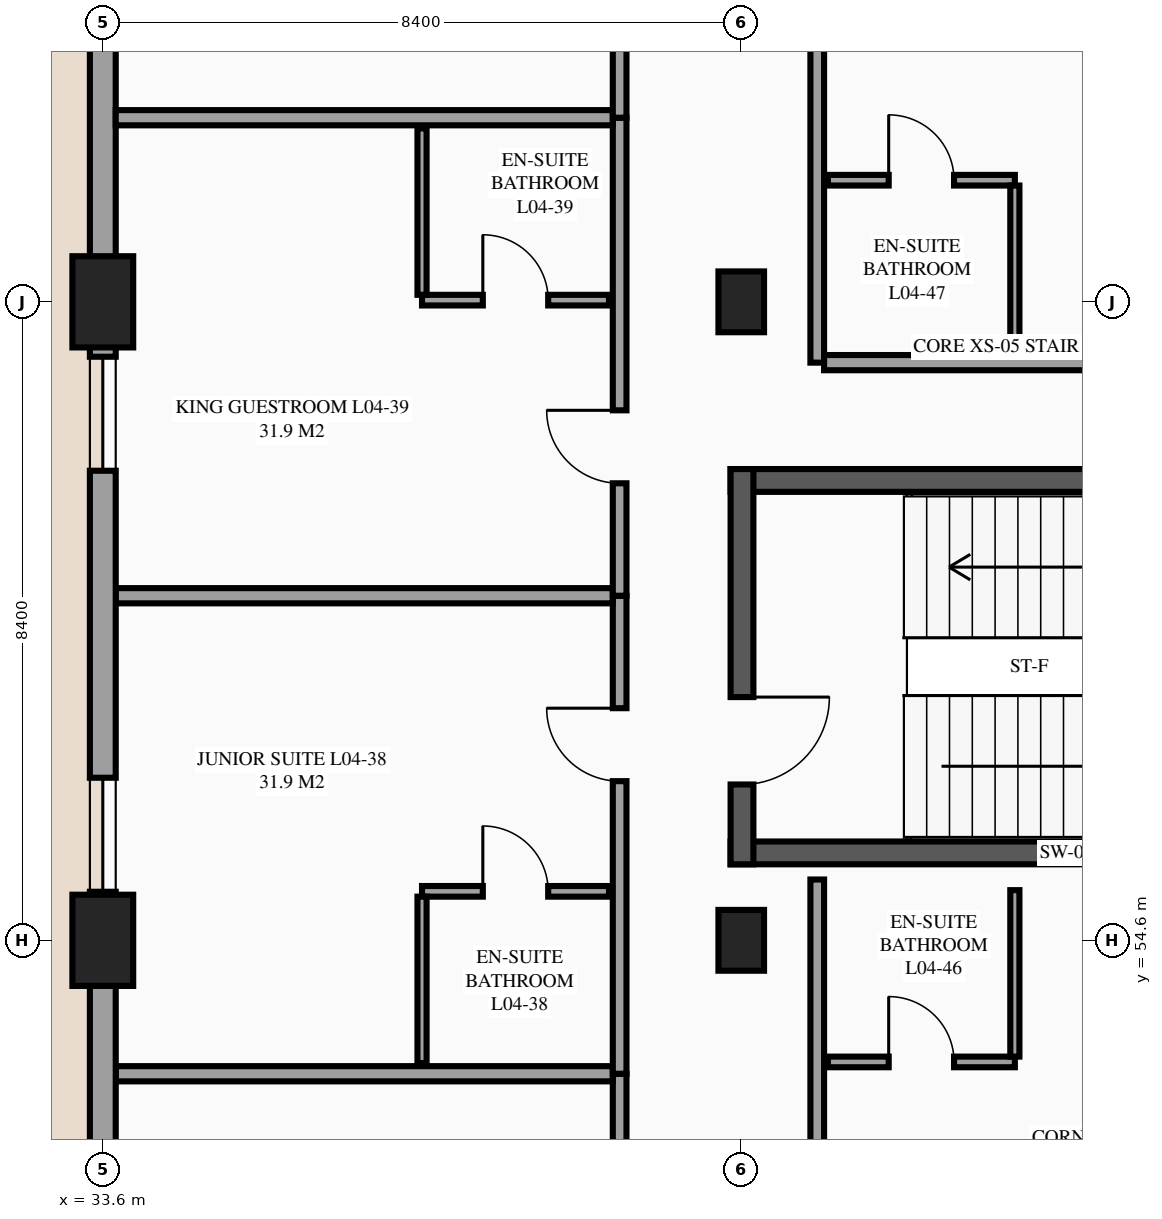
"""IFC4 building model, lengths in metres.
Left out: names, types, materials, properties, quantities, classifications, styles, units other than length and angle.
Written with IfcOpenShell. Run it as: python <this file> out.ifc"""

import sys

from ifc_helpers import new_model, si_unit, direction, frame, frame_2d, origin, origin_2d, place, context, subcontext, project, spatial, rectangle, extrude, element, fill, save


model = new_model("IFC4")
c1 = context("Model", 3, precision=1e-05, world=origin(), true_north=direction((0.0, 1.0)))
c2 = subcontext(c1, "Body", "Model", "MODEL_VIEW")
j1 = project(units=[si_unit("LENGTHUNIT", "METRE"), si_unit("PLANEANGLEUNIT", "RADIAN")], contexts=[c1])
p1 = place(None, origin())
s1 = spatial("IfcSite", under=j1, at=p1, CompositionType="ELEMENT")
p2 = place(p1, origin())
s2 = spatial("IfcBuilding", under=s1, at=p2, CompositionType="ELEMENT")
p3 = place(p2, frame((0.0, 0.0, 18.3)))
s3 = spatial("IfcBuildingStorey", under=s2, at=p3, CompositionType="ELEMENT", Elevation=18.3)
for number, where, z_axis, x_axis in (
    (1, (33.6, 54.6, 0.0), (0.0, 0.0, 1.0), (1.0, 0.0, 0.0)),
    (2, (33.6, 63.0, 0.0), (0.0, 0.0, 1.0), (1.0, 0.0, 0.0)),
):
    element("IfcColumn", number, at=place(p3, frame(where, z_axis=z_axis, x_axis=x_axis)), inside=s3, PredefinedType="COLUMN", context=c2, shape_type="SweptSolid", body=[
        extrude(rectangle(XDim=0.8, YDim=1.2, at=origin_2d()), origin(), (0.0, 0.0, 1.0), 3.6),
    ])
for number, where, z_axis, x_axis in (
    (3, (42.0, 54.6, 0.0), (0.0, 0.0, 1.0), (1.0, 0.0, 0.0)),
    (4, (42.0, 63.0, 0.0), (0.0, 0.0, 1.0), (1.0, 0.0, 0.0)),
):
    element("IfcColumn", number, at=place(p3, frame(where, z_axis=z_axis, x_axis=x_axis)), inside=s3, PredefinedType="COLUMN", context=c2, shape_type="SweptSolid", body=[
        extrude(rectangle(XDim=0.6, YDim=0.8, at=origin_2d()), origin(), (0.0, 0.0, 1.0), 3.6),
    ])
p4 = place(p3, frame((33.6, 79.8, 0.0), z_axis=(0.0, 0.0, 1.0), x_axis=(0.0, -1.0, 0.0)))
e5 = element("IfcWall", 5, at=p4, inside=s3, PredefinedType="STANDARD", context=c2, shape_type="SweptSolid", body=[
    extrude(rectangle(XDim=16.8, YDim=0.34, at=frame_2d((8.4, 0.0))), origin(), (0.0, 0.0, 1.0), 2.53),
])
p5 = place(p4, frame((10.483, 0.0, 0.85)))
e6 = element("IfcOpeningElement", 6, at=p5, cuts=e5, PredefinedType="OPENING", context=c2, shape_type="SweptSolid", body=[
    extrude(rectangle(XDim=1.5, YDim=1.5, at=frame_2d((0.75, 0.75))), frame((0.0, 0.18, 0.0), z_axis=(0.0, -1.0, 0.0), x_axis=(1.0, 0.0, 0.0)), (0.0, 0.0, 1.0), 0.36),
])
p6 = place(p4, frame((4.344, 0.0, 0.85)))
e7 = element("IfcOpeningElement", 7, at=p6, cuts=e5, PredefinedType="OPENING", context=c2, shape_type="SweptSolid", body=[
    extrude(rectangle(XDim=1.2, YDim=1.5, at=frame_2d((0.6, 0.75))), frame((0.0, 0.18, 0.0), z_axis=(0.0, -1.0, 0.0), x_axis=(1.0, 0.0, 0.0)), (0.0, 0.0, 1.0), 0.36),
])
for number, where, z_axis, x_axis in (
    (8, (41.86, 55.75, 0.0), (0.0, 0.0, 1.0), (1.0, 0.0, 0.0)),
    (9, (50.7, 60.65, 0.0), (0.0, 0.0, 1.0), (-1.0, 0.0, 0.0)),
):
    element("IfcWall", number, at=place(p3, frame(where, z_axis=z_axis, x_axis=x_axis)), inside=s3, PredefinedType="SHEAR", context=c2, shape_type="SweptSolid", body=[
        extrude(rectangle(XDim=8.84, YDim=0.3, at=frame_2d((4.42, 0.0))), origin(), (0.0, 0.0, 1.0), 3.6),
    ])
p7 = place(p3, frame((42.01, 60.8, 0.0), z_axis=(0.0, 0.0, 1.0), x_axis=(0.0, -1.0, 0.0)))
e10 = element("IfcWall", 10, at=p7, inside=s3, PredefinedType="SHEAR", context=c2, shape_type="SweptSolid", body=[
    extrude(rectangle(XDim=5.2, YDim=0.3, at=frame_2d((2.6, 0.0))), origin(), (0.0, 0.0, 1.0), 3.6),
])
p8 = place(p7, frame((3.0, 0.0, 0.0)))
e11 = element("IfcOpeningElement", 11, at=p8, cuts=e10, PredefinedType="OPENING", context=c2, shape_type="SweptSolid", body=[
    extrude(rectangle(XDim=1.15, YDim=2.15, at=frame_2d((0.575, 1.075))), frame((0.0, 0.16, 0.0), z_axis=(0.0, -1.0, 0.0), x_axis=(1.0, 0.0, 0.0)), (0.0, 0.0, 1.0), 0.32),
])
p9 = place(p3, frame((40.4, 46.556, 0.0), z_axis=(0.0, 0.0, 1.0), x_axis=(0.0, 1.0, 0.0)))
e12 = element("IfcWall", 12, at=p9, inside=s3, PredefinedType="PARTITIONING", context=c2, shape_type="SweptSolid", body=[
    extrude(rectangle(XDim=6.289, YDim=0.18, at=frame_2d((3.145, 0.0))), origin(), (0.0, 0.0, 1.0), 3.375),
])
p10 = place(p9, frame((3.849, 0.0, 0.0)))
e13 = element("IfcOpeningElement", 13, at=p10, cuts=e12, PredefinedType="OPENING", context=c2, shape_type="SweptSolid", body=[
    extrude(rectangle(XDim=0.96, YDim=2.15, at=frame_2d((0.48, 1.075))), frame((0.0, 0.1, 0.0), z_axis=(0.0, -1.0, 0.0), x_axis=(1.0, 0.0, 0.0)), (0.0, 0.0, 1.0), 0.2),
])
p11 = place(p3, frame((33.77, 52.844, 0.0), z_axis=(0.0, 0.0, 1.0), x_axis=(1.0, 0.0, 0.0)))
e14 = element("IfcWall", 14, at=p11, inside=s3, PredefinedType="PARTITIONING", context=c2, shape_type="SweptSolid", body=[
    extrude(rectangle(XDim=6.54, YDim=0.2, at=frame_2d((3.27, 0.0))), origin(), (0.0, 0.0, 1.0), 3.375),
])
p12 = place(p3, frame((40.4, 52.844, 0.0), z_axis=(0.0, 0.0, 1.0), x_axis=(0.0, 1.0, 0.0)))
e15 = element("IfcWall", 15, at=p12, inside=s3, PredefinedType="PARTITIONING", context=c2, shape_type="SweptSolid", body=[
    extrude(rectangle(XDim=6.289, YDim=0.18, at=frame_2d((3.145, 0.0))), origin(), (0.0, 0.0, 1.0), 3.375),
])
p13 = place(p12, frame((3.85, 0.0, 0.0)))
e16 = element("IfcOpeningElement", 16, at=p13, cuts=e15, PredefinedType="OPENING", context=c2, shape_type="SweptSolid", body=[
    extrude(rectangle(XDim=0.96, YDim=2.15, at=frame_2d((0.48, 1.075))), frame((0.0, 0.1, 0.0), z_axis=(0.0, -1.0, 0.0), x_axis=(1.0, 0.0, 0.0)), (0.0, 0.0, 1.0), 0.2),
])
p14 = place(p3, frame((33.77, 59.133, 0.0), z_axis=(0.0, 0.0, 1.0), x_axis=(1.0, 0.0, 0.0)))
e17 = element("IfcWall", 17, at=p14, inside=s3, PredefinedType="PARTITIONING", context=c2, shape_type="SweptSolid", body=[
    extrude(rectangle(XDim=6.54, YDim=0.2, at=frame_2d((3.27, 0.0))), origin(), (0.0, 0.0, 1.0), 3.375),
])
p15 = place(p3, frame((37.8, 55.244, 0.0), z_axis=(0.0, 0.0, 1.0), x_axis=(1.0, 0.0, 0.0)))
e18 = element("IfcWall", 18, at=p15, inside=s3, PredefinedType="PARTITIONING", context=c2, shape_type="SweptSolid", body=[
    extrude(rectangle(XDim=2.46, YDim=0.14, at=frame_2d((1.23, 0.0))), origin(), (0.0, 0.0, 1.0), 3.375),
])
p16 = place(p15, frame((0.8, 0.0, 0.0)))
e19 = element("IfcOpeningElement", 19, at=p16, cuts=e18, PredefinedType="OPENING", context=c2, shape_type="SweptSolid", body=[
    extrude(rectangle(XDim=0.86, YDim=2.1, at=frame_2d((0.43, 1.05))), frame((0.0, 0.08, 0.0), z_axis=(0.0, -1.0, 0.0), x_axis=(1.0, 0.0, 0.0)), (0.0, 0.0, 1.0), 0.16),
])
p17 = place(p3, frame((37.8, 52.984, 0.0), z_axis=(0.0, 0.0, 1.0), x_axis=(0.0, 1.0, 0.0)))
e20 = element("IfcWall", 20, at=p17, inside=s3, PredefinedType="PARTITIONING", context=c2, shape_type="SweptSolid", body=[
    extrude(rectangle(XDim=2.19, YDim=0.12, at=frame_2d((1.095, 0.0))), origin(), (0.0, 0.0, 1.0), 3.375),
])
p18 = place(p3, frame((40.4, 59.133, 0.0), z_axis=(0.0, 0.0, 1.0), x_axis=(0.0, 1.0, 0.0)))
e21 = element("IfcWall", 21, at=p18, inside=s3, PredefinedType="PARTITIONING", context=c2, shape_type="SweptSolid", body=[
    extrude(rectangle(XDim=6.289, YDim=0.18, at=frame_2d((3.145, 0.0))), origin(), (0.0, 0.0, 1.0), 3.375),
])
p19 = place(p18, frame((1.479, 0.0, 0.0)))
e22 = element("IfcOpeningElement", 22, at=p19, cuts=e21, PredefinedType="OPENING", context=c2, shape_type="SweptSolid", body=[
    extrude(rectangle(XDim=0.96, YDim=2.15, at=frame_2d((0.48, 1.075))), frame((0.0, 0.1, 0.0), z_axis=(0.0, -1.0, 0.0), x_axis=(1.0, 0.0, 0.0)), (0.0, 0.0, 1.0), 0.2),
])
p20 = place(p3, frame((33.77, 65.422, 0.0), z_axis=(0.0, 0.0, 1.0), x_axis=(1.0, 0.0, 0.0)))
e23 = element("IfcWall", 23, at=p20, inside=s3, PredefinedType="PARTITIONING", context=c2, shape_type="SweptSolid", body=[
    extrude(rectangle(XDim=6.54, YDim=0.2, at=frame_2d((3.27, 0.0))), origin(), (0.0, 0.0, 1.0), 3.375),
])
p21 = place(p3, frame((37.8, 63.022, 0.0), z_axis=(0.0, 0.0, 1.0), x_axis=(1.0, 0.0, 0.0)))
e24 = element("IfcWall", 24, at=p21, inside=s3, PredefinedType="PARTITIONING", context=c2, shape_type="SweptSolid", body=[
    extrude(rectangle(XDim=2.46, YDim=0.14, at=frame_2d((1.23, 0.0))), origin(), (0.0, 0.0, 1.0), 2.63),
])
p22 = place(p21, frame((0.8, 0.0, 0.0)))
e25 = element("IfcOpeningElement", 25, at=p22, cuts=e24, PredefinedType="OPENING", context=c2, shape_type="SweptSolid", body=[
    extrude(rectangle(XDim=0.86, YDim=2.1, at=frame_2d((0.43, 1.05))), frame((0.0, 0.08, 0.0), z_axis=(0.0, -1.0, 0.0), x_axis=(1.0, 0.0, 0.0)), (0.0, 0.0, 1.0), 0.16),
])
p23 = place(p3, frame((37.8, 63.092, 0.0), z_axis=(0.0, 0.0, 1.0), x_axis=(0.0, 1.0, 0.0)))
e26 = element("IfcWall", 26, at=p23, inside=s3, PredefinedType="PARTITIONING", context=c2, shape_type="SweptSolid", body=[
    extrude(rectangle(XDim=2.19, YDim=0.12, at=frame_2d((1.095, 0.0))), origin(), (0.0, 0.0, 1.0), 3.375),
])
p24 = place(p3, frame((40.4, 65.422, 0.0), z_axis=(0.0, 0.0, 1.0), x_axis=(0.0, 1.0, 0.0)))
e27 = element("IfcWall", 27, at=p24, inside=s3, PredefinedType="PARTITIONING", context=c2, shape_type="SweptSolid", body=[
    extrude(rectangle(XDim=6.289, YDim=0.18, at=frame_2d((3.145, 0.0))), origin(), (0.0, 0.0, 1.0), 3.375),
])
p25 = place(p24, frame((1.479, 0.0, 0.0)))
e28 = element("IfcOpeningElement", 28, at=p25, cuts=e27, PredefinedType="OPENING", context=c2, shape_type="SweptSolid", body=[
    extrude(rectangle(XDim=0.96, YDim=2.15, at=frame_2d((0.48, 1.075))), frame((0.0, 0.1, 0.0), z_axis=(0.0, -1.0, 0.0), x_axis=(1.0, 0.0, 0.0)), (0.0, 0.0, 1.0), 0.2),
])
p26 = place(p3, frame((43.0, 49.4, 0.0), z_axis=(0.0, 0.0, 1.0), x_axis=(0.0, 1.0, 0.0)))
e29 = element("IfcWall", 29, at=p26, inside=s3, PredefinedType="PARTITIONING", context=c2, shape_type="SweptSolid", body=[
    extrude(rectangle(XDim=6.0, YDim=0.18, at=frame_2d((3.0, 0.0))), origin(), (0.0, 0.0, 1.0), 3.375),
])
p27 = place(p26, frame((1.335, 0.0, 0.0)))
e30 = element("IfcOpeningElement", 30, at=p27, cuts=e29, PredefinedType="OPENING", context=c2, shape_type="SweptSolid", body=[
    extrude(rectangle(XDim=0.96, YDim=2.15, at=frame_2d((0.48, 1.075))), frame((0.0, 0.1, 0.0), z_axis=(0.0, -1.0, 0.0), x_axis=(1.0, 0.0, 0.0)), (0.0, 0.0, 1.0), 0.2),
])
p28 = place(p3, frame((43.14, 53.0, 0.0), z_axis=(0.0, 0.0, 1.0), x_axis=(1.0, 0.0, 0.0)))
e31 = element("IfcWall", 31, at=p28, inside=s3, PredefinedType="PARTITIONING", context=c2, shape_type="SweptSolid", body=[
    extrude(rectangle(XDim=2.46, YDim=0.14, at=frame_2d((1.23, 0.0))), origin(), (0.0, 0.0, 1.0), 3.375),
])
p29 = place(p28, frame((0.8, 0.0, 0.0)))
e32 = element("IfcOpeningElement", 32, at=p29, cuts=e31, PredefinedType="OPENING", context=c2, shape_type="SweptSolid", body=[
    extrude(rectangle(XDim=0.86, YDim=2.1, at=frame_2d((0.43, 1.05))), frame((0.0, 0.08, 0.0), z_axis=(0.0, -1.0, 0.0), x_axis=(1.0, 0.0, 0.0)), (0.0, 0.0, 1.0), 0.16),
])
p30 = place(p3, frame((45.6, 53.07, 0.0), z_axis=(0.0, 0.0, 1.0), x_axis=(0.0, 1.0, 0.0)))
e33 = element("IfcWall", 33, at=p30, inside=s3, PredefinedType="PARTITIONING", context=c2, shape_type="SweptSolid", body=[
    extrude(rectangle(XDim=2.19, YDim=0.12, at=frame_2d((1.095, 0.0))), origin(), (0.0, 0.0, 1.0), 3.375),
])
p31 = place(p3, frame((43.0, 62.2, 0.0), z_axis=(0.0, 0.0, 1.0), x_axis=(0.0, 1.0, 0.0)))
e34 = element("IfcWall", 34, at=p31, inside=s3, PredefinedType="PARTITIONING", context=c2, shape_type="SweptSolid", body=[
    extrude(rectangle(XDim=7.9, YDim=0.18, at=frame_2d((3.95, 0.0))), origin(), (0.0, 0.0, 1.0), 3.375),
])
p32 = place(p31, frame((4.655, 0.0, 0.0)))
e35 = element("IfcOpeningElement", 35, at=p32, cuts=e34, PredefinedType="OPENING", context=c2, shape_type="SweptSolid", body=[
    extrude(rectangle(XDim=0.96, YDim=2.15, at=frame_2d((0.48, 1.075))), frame((0.0, 0.1, 0.0), z_axis=(0.0, -1.0, 0.0), x_axis=(1.0, 0.0, 0.0)), (0.0, 0.0, 1.0), 0.2),
])
p33 = place(p3, frame((43.09, 62.2, 0.0), z_axis=(0.0, 0.0, 1.0), x_axis=(1.0, 0.0, 0.0)))
e36 = element("IfcWall", 36, at=p33, inside=s3, PredefinedType="PARTITIONING", context=c2, shape_type="SweptSolid", body=[
    extrude(rectangle(XDim=7.14, YDim=0.2, at=frame_2d((3.57, 0.0))), origin(), (0.0, 0.0, 1.0), 3.375),
])
p34 = place(p3, frame((43.14, 64.6, 0.0), z_axis=(0.0, 0.0, 1.0), x_axis=(1.0, 0.0, 0.0)))
e37 = element("IfcWall", 37, at=p34, inside=s3, PredefinedType="PARTITIONING", context=c2, shape_type="SweptSolid", body=[
    extrude(rectangle(XDim=2.46, YDim=0.14, at=frame_2d((1.23, 0.0))), origin(), (0.0, 0.0, 1.0), 3.375),
])
p35 = place(p34, frame((0.8, 0.0, 0.0)))
e38 = element("IfcOpeningElement", 38, at=p35, cuts=e37, PredefinedType="OPENING", context=c2, shape_type="SweptSolid", body=[
    extrude(rectangle(XDim=0.86, YDim=2.1, at=frame_2d((0.43, 1.05))), frame((0.0, 0.08, 0.0), z_axis=(0.0, -1.0, 0.0), x_axis=(1.0, 0.0, 0.0)), (0.0, 0.0, 1.0), 0.16),
])
p36 = place(p3, frame((45.6, 62.34, 0.0), z_axis=(0.0, 0.0, 1.0), x_axis=(0.0, 1.0, 0.0)))
e39 = element("IfcWall", 39, at=p36, inside=s3, PredefinedType="PARTITIONING", context=c2, shape_type="SweptSolid", body=[
    extrude(rectangle(XDim=2.19, YDim=0.12, at=frame_2d((1.095, 0.0))), origin(), (0.0, 0.0, 1.0), 3.375),
])
p37 = place(p3, frame((33.6, 63.0, 0.0), z_axis=(0.0, 0.0, 1.0), x_axis=(0.0, -1.0, 0.0)))
e40 = element("IfcWall", 40, at=p37, inside=s3, PredefinedType="STANDARD", context=c2, shape_type="SweptSolid", body=[
    extrude(rectangle(XDim=8.4, YDim=0.34, at=frame_2d((4.2, 0.0))), origin(), (0.0, 0.0, 1.0), 3.133),
])
p38 = place(p37, frame((6.261, 0.0, 0.85)))
e41 = element("IfcOpeningElement", 41, at=p38, cuts=e40, PredefinedType="OPENING", context=c2, shape_type="SweptSolid", body=[
    extrude(rectangle(XDim=1.5, YDim=1.5, at=frame_2d((0.75, 0.75))), frame((0.0, 0.18, 0.0), z_axis=(0.0, -1.0, 0.0), x_axis=(1.0, 0.0, 0.0)), (0.0, 0.0, 1.0), 0.36),
])
p39 = place(p37, frame((0.722, 0.0, 0.85)))
e42 = element("IfcOpeningElement", 42, at=p39, cuts=e40, PredefinedType="OPENING", context=c2, shape_type="SweptSolid", body=[
    extrude(rectangle(XDim=1.5, YDim=1.5, at=frame_2d((0.75, 0.75))), frame((0.0, 0.18, 0.0), z_axis=(0.0, -1.0, 0.0), x_axis=(1.0, 0.0, 0.0)), (0.0, 0.0, 1.0), 0.36),
])
p40 = place(p3, frame((33.6, 54.6, 0.0), z_axis=(0.0, 0.0, 1.0), x_axis=(0.0, -1.0, 0.0)))
e43 = element("IfcWall", 43, at=p40, inside=s3, PredefinedType="STANDARD", context=c2, shape_type="SweptSolid", body=[
    extrude(rectangle(XDim=8.4, YDim=0.34, at=frame_2d((4.2, 0.0))), origin(), (0.0, 0.0, 1.0), 2.53),
])
p41 = place(p40, frame((4.15, 0.0, 0.85)))
e44 = element("IfcOpeningElement", 44, at=p41, cuts=e43, PredefinedType="OPENING", context=c2, shape_type="SweptSolid", body=[
    extrude(rectangle(XDim=1.5, YDim=1.5, at=frame_2d((0.75, 0.75))), frame((0.0, 0.18, 0.0), z_axis=(0.0, -1.0, 0.0), x_axis=(1.0, 0.0, 0.0)), (0.0, 0.0, 1.0), 0.36),
])
p42 = place(p38, origin())
e45 = element("IfcWindow", 45, at=p42, inside=s3, PartitioningType="SINGLE_PANEL", PredefinedType="WINDOW", context=c2, shape_type="SweptSolid", body=[
    extrude(rectangle(XDim=1.5, YDim=1.5, at=frame_2d((0.75, 0.75))), frame((0.0, 0.03, 0.0), z_axis=(0.0, -1.0, 0.0), x_axis=(1.0, 0.0, 0.0)), (0.0, 0.0, 1.0), 0.06),
])
fill(e41, e45)
p43 = place(p39, origin())
e46 = element("IfcWindow", 46, at=p43, inside=s3, PartitioningType="SINGLE_PANEL", PredefinedType="WINDOW", context=c2, shape_type="SweptSolid", body=[
    extrude(rectangle(XDim=1.5, YDim=1.5, at=frame_2d((0.75, 0.75))), frame((0.0, 0.03, 0.0), z_axis=(0.0, -1.0, 0.0), x_axis=(1.0, 0.0, 0.0)), (0.0, 0.0, 1.0), 0.06),
])
fill(e42, e46)
p44 = place(p8, origin())
e47 = element("IfcDoor", 47, at=p44, inside=s3, OperationType="SINGLE_SWING_LEFT", PredefinedType="DOOR", context=c2, shape_type="SweptSolid", body=[
    extrude(rectangle(XDim=1.15, YDim=2.15, at=frame_2d((0.575, 1.075))), frame((0.0, 0.025, 0.0), z_axis=(0.0, -1.0, 0.0), x_axis=(1.0, 0.0, 0.0)), (0.0, 0.0, 1.0), 0.05),
])
fill(e11, e47)
p45 = place(p13, origin())
e48 = element("IfcDoor", 48, at=p45, inside=s3, OperationType="SINGLE_SWING_RIGHT", PredefinedType="DOOR", context=c2, shape_type="SweptSolid", body=[
    extrude(rectangle(XDim=0.96, YDim=2.15, at=frame_2d((0.48, 1.075))), frame((0.0, 0.025, 0.0), z_axis=(0.0, -1.0, 0.0), x_axis=(1.0, 0.0, 0.0)), (0.0, 0.0, 1.0), 0.05),
])
fill(e16, e48)
p46 = place(p16, origin())
e49 = element("IfcDoor", 49, at=p46, inside=s3, OperationType="SINGLE_SWING_LEFT", PredefinedType="DOOR", context=c2, shape_type="SweptSolid", body=[
    extrude(rectangle(XDim=0.86, YDim=2.1, at=frame_2d((0.43, 1.05))), frame((0.0, 0.025, 0.0), z_axis=(0.0, -1.0, 0.0), x_axis=(1.0, 0.0, 0.0)), (0.0, 0.0, 1.0), 0.05),
])
fill(e19, e49)
p47 = place(p19, origin())
e50 = element("IfcDoor", 50, at=p47, inside=s3, OperationType="SINGLE_SWING_RIGHT", PredefinedType="DOOR", context=c2, shape_type="SweptSolid", body=[
    extrude(rectangle(XDim=0.96, YDim=2.15, at=frame_2d((0.48, 1.075))), frame((0.0, 0.025, 0.0), z_axis=(0.0, -1.0, 0.0), x_axis=(1.0, 0.0, 0.0)), (0.0, 0.0, 1.0), 0.05),
])
fill(e22, e50)
p48 = place(p22, origin())
e51 = element("IfcDoor", 51, at=p48, inside=s3, OperationType="SINGLE_SWING_LEFT", PredefinedType="DOOR", context=c2, shape_type="SweptSolid", body=[
    extrude(rectangle(XDim=0.86, YDim=2.1, at=frame_2d((0.43, 1.05))), frame((0.0, 0.025, 0.0), z_axis=(0.0, -1.0, 0.0), x_axis=(1.0, 0.0, 0.0)), (0.0, 0.0, 1.0), 0.05),
])
fill(e25, e51)
p49 = place(p29, origin())
e52 = element("IfcDoor", 52, at=p49, inside=s3, OperationType="SINGLE_SWING_LEFT", PredefinedType="DOOR", context=c2, shape_type="SweptSolid", body=[
    extrude(rectangle(XDim=0.86, YDim=2.1, at=frame_2d((0.43, 1.05))), frame((0.0, 0.025, 0.0), z_axis=(0.0, -1.0, 0.0), x_axis=(1.0, 0.0, 0.0)), (0.0, 0.0, 1.0), 0.05),
])
fill(e32, e52)
p50 = place(p35, origin())
e53 = element("IfcDoor", 53, at=p50, inside=s3, OperationType="SINGLE_SWING_LEFT", PredefinedType="DOOR", context=c2, shape_type="SweptSolid", body=[
    extrude(rectangle(XDim=0.86, YDim=2.1, at=frame_2d((0.43, 1.05))), frame((0.0, 0.025, 0.0), z_axis=(0.0, -1.0, 0.0), x_axis=(1.0, 0.0, 0.0)), (0.0, 0.0, 1.0), 0.05),
])
fill(e38, e53)
save(model, sys.argv[1])
